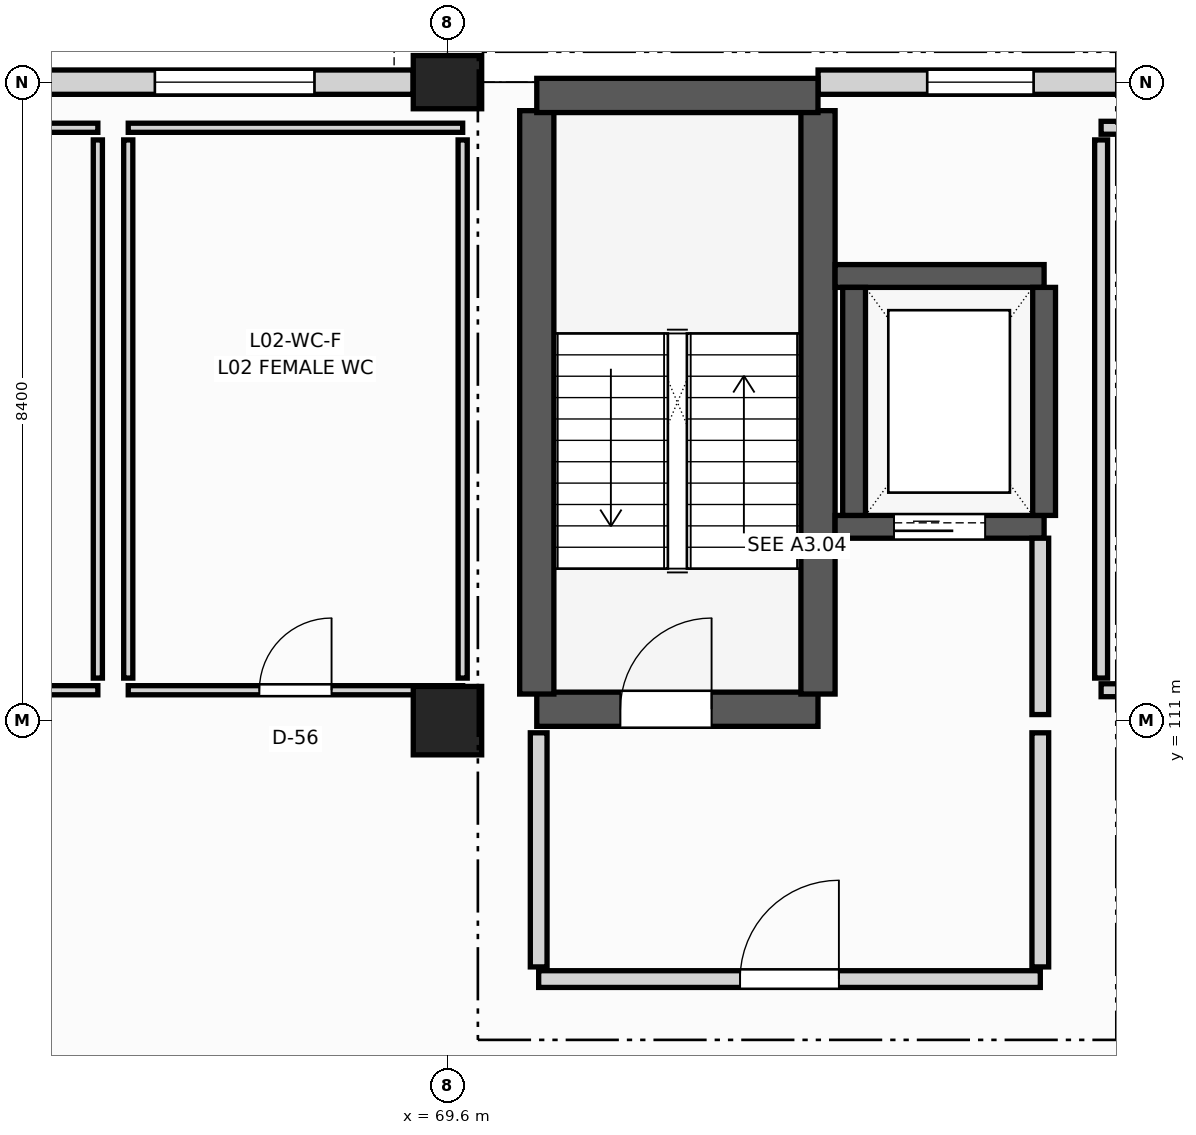
"""IFC4 building model, lengths in metres.
Left out: names, types, materials, properties, quantities, classifications, styles, units other than length and angle.
Written with IfcOpenShell. Run it as: python <this file> out.ifc"""

import sys

from ifc_helpers import new_model, si_unit, direction, frame, frame_2d, origin, origin_2d, place, context, subcontext, project, spatial, rectangle, extrude, element, fill, save


model = new_model("IFC4")
c1 = context("Model", 3, precision=1e-05, world=origin(), true_north=direction((0.0, 1.0)))
c2 = subcontext(c1, "Body", "Model", "MODEL_VIEW")
j1 = project(units=[si_unit("LENGTHUNIT", "METRE"), si_unit("PLANEANGLEUNIT", "RADIAN")], contexts=[c1])
p1 = place(None, origin())
s1 = spatial("IfcSite", under=j1, at=p1, CompositionType="ELEMENT")
p2 = place(p1, origin())
s2 = spatial("IfcBuilding", under=s1, at=p2, CompositionType="ELEMENT")
p3 = place(p2, frame((0.0, 0.0, 9.9)))
s3 = spatial("IfcBuildingStorey", under=s2, at=p3, CompositionType="ELEMENT", Elevation=9.9)
p4 = place(p3, frame((69.6, 111.0, 0.0), z_axis=(0.0, 0.0, 1.0), x_axis=(1.0, 0.0, 0.0)))
e1 = element("IfcColumn", 1, at=p4, inside=s3, PredefinedType="COLUMN", context=c2, shape_type="SweptSolid", body=[
    extrude(rectangle(XDim=0.9, YDim=0.9, at=origin_2d()), origin(), (0.0, 0.0, 1.0), 3.9),
])
p5 = place(p3, frame((69.6, 119.4, 0.0), z_axis=(0.0, 0.0, 1.0), x_axis=(1.0, 0.0, 0.0)))
e2 = element("IfcColumn", 2, at=p5, inside=s3, PredefinedType="COLUMN", context=c2, shape_type="SweptSolid", body=[
    extrude(rectangle(XDim=0.9, YDim=0.7, at=origin_2d()), origin(), (0.0, 0.0, 1.0), 3.9),
])
p6 = place(p3, frame((60.452, 119.4, 0.0), z_axis=(0.0, 0.0, 1.0), x_axis=(1.0, 0.0, 0.0)))
e3 = element("IfcWall", 3, at=p6, inside=s3, PredefinedType="SOLIDWALL", context=c2, shape_type="SweptSolid", body=[
    extrude(rectangle(XDim=8.696, YDim=0.32, at=frame_2d((4.348, 0.0))), origin(), (0.0, 0.0, 1.0), 3.08),
])
p7 = place(p6, frame((1.298, 0.0, 0.85)))
e4 = element("IfcOpeningElement", 4, at=p7, cuts=e3, PredefinedType="OPENING", context=c2, shape_type="SweptSolid", body=[
    extrude(rectangle(XDim=2.1, YDim=1.95, at=frame_2d((1.05, 0.975))), frame((0.0, 0.17, 0.0), z_axis=(0.0, -1.0, 0.0), x_axis=(1.0, 0.0, 0.0)), (0.0, 0.0, 1.0), 0.34),
])
p8 = place(p6, frame((5.298, 0.0, 0.85)))
e5 = element("IfcOpeningElement", 5, at=p8, cuts=e3, PredefinedType="OPENING", context=c2, shape_type="SweptSolid", body=[
    extrude(rectangle(XDim=2.1, YDim=1.95, at=frame_2d((1.05, 0.975))), frame((0.0, 0.17, 0.0), z_axis=(0.0, -1.0, 0.0), x_axis=(1.0, 0.0, 0.0)), (0.0, 0.0, 1.0), 0.34),
])
p9 = place(p3, frame((74.476, 119.4, 0.0), z_axis=(0.0, 0.0, 1.0), x_axis=(1.0, 0.0, 0.0)))
e6 = element("IfcWall", 6, at=p9, inside=s3, PredefinedType="SOLIDWALL", context=c2, shape_type="SweptSolid", body=[
    extrude(rectangle(XDim=4.272, YDim=0.32, at=frame_2d((2.136, 0.0))), origin(), (0.0, 0.0, 1.0), 3.08),
])
p10 = place(p9, frame((1.436, 0.0, 0.9)))
e7 = element("IfcOpeningElement", 7, at=p10, cuts=e6, PredefinedType="OPENING", context=c2, shape_type="SweptSolid", body=[
    extrude(rectangle(XDim=1.4, YDim=1.65, at=frame_2d((0.7, 0.825))), frame((0.0, 0.17, 0.0), z_axis=(0.0, -1.0, 0.0), x_axis=(1.0, 0.0, 0.0)), (0.0, 0.0, 1.0), 0.34),
])
p11 = place(p3, frame((70.775, 111.15, 0.0), z_axis=(0.0, 0.0, 1.0), x_axis=(1.0, 0.0, 0.0)))
e8 = element("IfcWall", 8, at=p11, inside=s3, PredefinedType="SHEAR", context=c2, shape_type="SweptSolid", body=[
    extrude(rectangle(XDim=3.7, YDim=0.45, at=frame_2d((1.85, 0.0))), origin(), (0.0, 0.0, 1.0), 3.9),
])
p12 = place(p11, frame((1.1, 0.0, 0.0)))
e9 = element("IfcOpeningElement", 9, at=p12, cuts=e8, PredefinedType="OPENING", context=c2, shape_type="SweptSolid", body=[
    extrude(rectangle(XDim=1.2, YDim=2.2, at=frame_2d((0.6, 1.1))), frame((0.0, 0.235, 0.0), z_axis=(0.0, -1.0, 0.0), x_axis=(1.0, 0.0, 0.0)), (0.0, 0.0, 1.0), 0.47),
])
for number, where, z_axis, x_axis in (
    (10, (70.775, 111.35, 0.0), (0.0, 0.0, 1.0), (0.0, 1.0, 0.0)),
    (11, (74.475, 111.35, 0.0), (0.0, 0.0, 1.0), (0.0, 1.0, 0.0)),
):
    element("IfcWall", number, at=place(p3, frame(where, z_axis=z_axis, x_axis=x_axis)), inside=s3, PredefinedType="SHEAR", context=c2, shape_type="SweptSolid", body=[
        extrude(rectangle(XDim=7.675, YDim=0.45, at=frame_2d((3.837, 0.0))), origin(), (0.0, 0.0, 1.0), 3.9),
    ])
p13 = place(p3, frame((70.775, 119.225, 0.0), z_axis=(0.0, 0.0, 1.0), x_axis=(1.0, 0.0, 0.0)))
e12 = element("IfcWall", 12, at=p13, inside=s3, PredefinedType="SHEAR", context=c2, shape_type="SweptSolid", body=[
    extrude(rectangle(XDim=3.7, YDim=0.45, at=frame_2d((1.85, 0.0))), origin(), (0.0, 0.0, 1.0), 3.9),
])
p14 = place(p3, frame((74.7, 113.55, 0.0), z_axis=(0.0, 0.0, 1.0), x_axis=(1.0, 0.0, 0.0)))
e13 = element("IfcWall", 13, at=p14, inside=s3, PredefinedType="SHEAR", context=c2, shape_type="SweptSolid", body=[
    extrude(rectangle(XDim=2.75, YDim=0.3, at=frame_2d((1.375, 0.0))), origin(), (0.0, 0.0, 1.0), 3.9),
])
p15 = place(p14, frame((0.775, 0.0, 0.0)))
e14 = element("IfcOpeningElement", 14, at=p15, cuts=e13, PredefinedType="OPENING", context=c2, shape_type="SweptSolid", body=[
    extrude(rectangle(XDim=1.2, YDim=2.2, at=frame_2d((0.6, 1.1))), frame((0.0, 0.16, 0.0), z_axis=(0.0, -1.0, 0.0), x_axis=(1.0, 0.0, 0.0)), (0.0, 0.0, 1.0), 0.32),
])
p16 = place(p3, frame((74.7, 116.85, 0.0), z_axis=(0.0, 0.0, 1.0), x_axis=(1.0, 0.0, 0.0)))
e15 = element("IfcWall", 15, at=p16, inside=s3, PredefinedType="SHEAR", context=c2, shape_type="SweptSolid", body=[
    extrude(rectangle(XDim=2.75, YDim=0.3, at=frame_2d((1.375, 0.0))), origin(), (0.0, 0.0, 1.0), 3.9),
])
for number, where, z_axis, x_axis in (
    (16, (74.95, 113.7, 0.0), (0.0, 0.0, 1.0), (0.0, 1.0, 0.0)),
    (17, (77.45, 113.7, 0.0), (0.0, 0.0, 1.0), (0.0, 1.0, 0.0)),
):
    element("IfcWall", number, at=place(p3, frame(where, z_axis=z_axis, x_axis=x_axis)), inside=s3, PredefinedType="SHEAR", context=c2, shape_type="SweptSolid", body=[
        extrude(rectangle(XDim=3.0, YDim=0.3, at=frame_2d((1.5, 0.0))), origin(), (0.0, 0.0, 1.0), 3.9),
    ])
p17 = place(p3, frame((70.8, 107.6, 0.0), z_axis=(0.0, 0.0, 1.0), x_axis=(1.0, 0.0, 0.0)))
e18 = element("IfcWall", 18, at=p17, inside=s3, PredefinedType="PARTITIONING", context=c2, shape_type="SweptSolid", body=[
    extrude(rectangle(XDim=6.6, YDim=0.22, at=frame_2d((3.3, 0.0))), origin(), (0.0, 0.0, 1.0), 2.92),
])
p18 = place(p17, frame((2.65, 0.0, 0.0)))
e19 = element("IfcOpeningElement", 19, at=p18, cuts=e18, PredefinedType="OPENING", context=c2, shape_type="SweptSolid", body=[
    extrude(rectangle(XDim=1.3, YDim=2.2, at=frame_2d((0.65, 1.1))), frame((0.0, 0.12, 0.0), z_axis=(0.0, -1.0, 0.0), x_axis=(1.0, 0.0, 0.0)), (0.0, 0.0, 1.0), 0.24),
])
p19 = place(p3, frame((77.4, 111.08, 0.0), z_axis=(0.0, 0.0, 1.0), x_axis=(0.0, 1.0, 0.0)))
e20 = element("IfcWall", 20, at=p19, inside=s3, PredefinedType="PARTITIONING", context=c2, shape_type="SweptSolid", body=[
    extrude(rectangle(XDim=2.32, YDim=0.22, at=frame_2d((1.16, 0.0))), origin(), (0.0, 0.0, 1.0), 2.92),
])
for number, where, z_axis, x_axis in (
    (21, (70.8, 107.76, 0.0), (0.0, 0.0, 1.0), (0.0, 1.0, 0.0)),
    (22, (77.4, 107.76, 0.0), (0.0, 0.0, 1.0), (0.0, 1.0, 0.0)),
):
    element("IfcWall", number, at=place(p3, frame(where, z_axis=z_axis, x_axis=x_axis)), inside=s3, PredefinedType="PARTITIONING", context=c2, shape_type="SweptSolid", body=[
        extrude(rectangle(XDim=3.08, YDim=0.22, at=frame_2d((1.54, 0.0))), origin(), (0.0, 0.0, 1.0), 2.92),
    ])
p20 = place(p3, frame((78.2, 111.4, 0.0), z_axis=(0.0, 0.0, 1.0), x_axis=(1.0, 0.0, 0.0)))
e23 = element("IfcWall", 23, at=p20, inside=s3, PredefinedType="PARTITIONING", context=c2, shape_type="SweptSolid", body=[
    extrude(rectangle(XDim=21.4, YDim=0.17, at=frame_2d((10.7, 0.0))), origin(), (0.0, 0.0, 1.0), 2.92),
])
p21 = place(p20, frame((6.94, 0.0, 0.0)))
e24 = element("IfcOpeningElement", 24, at=p21, cuts=e23, PredefinedType="OPENING", context=c2, shape_type="SweptSolid", body=[
    extrude(rectangle(XDim=1.1, YDim=2.2, at=frame_2d((0.55, 1.1))), frame((0.0, 0.095, 0.0), z_axis=(0.0, -1.0, 0.0), x_axis=(1.0, 0.0, 0.0)), (0.0, 0.0, 1.0), 0.19),
])
p22 = place(p3, frame((78.2, 118.8, 0.0), z_axis=(0.0, 0.0, 1.0), x_axis=(1.0, 0.0, 0.0)))
e25 = element("IfcWall", 25, at=p22, inside=s3, PredefinedType="PARTITIONING", context=c2, shape_type="SweptSolid", body=[
    extrude(rectangle(XDim=21.4, YDim=0.17, at=frame_2d((10.7, 0.0))), origin(), (0.0, 0.0, 1.0), 2.92),
])
p23 = place(p3, frame((78.2, 111.56, 0.0), z_axis=(0.0, 0.0, 1.0), x_axis=(0.0, 1.0, 0.0)))
e26 = element("IfcWall", 26, at=p23, inside=s3, PredefinedType="PARTITIONING", context=c2, shape_type="SweptSolid", body=[
    extrude(rectangle(XDim=7.08, YDim=0.17, at=frame_2d((3.54, 0.0))), origin(), (0.0, 0.0, 1.0), 2.92),
])
p24 = place(p3, frame((60.8, 111.4, 0.0), z_axis=(0.0, 0.0, 1.0), x_axis=(1.0, 0.0, 0.0)))
e27 = element("IfcWall", 27, at=p24, inside=s3, PredefinedType="PARTITIONING", context=c2, shape_type="SweptSolid", body=[
    extrude(rectangle(XDim=4.2, YDim=0.12, at=frame_2d((2.1, 0.0))), origin(), (0.0, 0.0, 1.0), 2.92),
])
p25 = place(p24, frame((1.625, 0.0, 0.0)))
e28 = element("IfcOpeningElement", 28, at=p25, cuts=e27, PredefinedType="OPENING", context=c2, shape_type="SweptSolid", body=[
    extrude(rectangle(XDim=0.95, YDim=2.1, at=frame_2d((0.475, 1.05))), frame((0.0, 0.07, 0.0), z_axis=(0.0, -1.0, 0.0), x_axis=(1.0, 0.0, 0.0)), (0.0, 0.0, 1.0), 0.14),
])
p26 = place(p3, frame((60.8, 118.8, 0.0), z_axis=(0.0, 0.0, 1.0), x_axis=(1.0, 0.0, 0.0)))
e29 = element("IfcWall", 29, at=p26, inside=s3, PredefinedType="PARTITIONING", context=c2, shape_type="SweptSolid", body=[
    extrude(rectangle(XDim=4.2, YDim=0.12, at=frame_2d((2.1, 0.0))), origin(), (0.0, 0.0, 1.0), 2.92),
])
p27 = place(p3, frame((65.0, 111.56, 0.0), z_axis=(0.0, 0.0, 1.0), x_axis=(0.0, 1.0, 0.0)))
e30 = element("IfcWall", 30, at=p27, inside=s3, PredefinedType="PARTITIONING", context=c2, shape_type="SweptSolid", body=[
    extrude(rectangle(XDim=7.08, YDim=0.12, at=frame_2d((3.54, 0.0))), origin(), (0.0, 0.0, 1.0), 2.92),
])
p28 = place(p3, frame((65.4, 111.4, 0.0), z_axis=(0.0, 0.0, 1.0), x_axis=(1.0, 0.0, 0.0)))
e31 = element("IfcWall", 31, at=p28, inside=s3, PredefinedType="PARTITIONING", context=c2, shape_type="SweptSolid", body=[
    extrude(rectangle(XDim=4.4, YDim=0.12, at=frame_2d((2.2, 0.0))), origin(), (0.0, 0.0, 1.0), 2.92),
])
p29 = place(p28, frame((1.725, 0.0, 0.0)))
e32 = element("IfcOpeningElement", 32, at=p29, cuts=e31, PredefinedType="OPENING", context=c2, shape_type="SweptSolid", body=[
    extrude(rectangle(XDim=0.95, YDim=2.1, at=frame_2d((0.475, 1.05))), frame((0.0, 0.07, 0.0), z_axis=(0.0, -1.0, 0.0), x_axis=(1.0, 0.0, 0.0)), (0.0, 0.0, 1.0), 0.14),
])
p30 = place(p3, frame((65.4, 118.8, 0.0), z_axis=(0.0, 0.0, 1.0), x_axis=(1.0, 0.0, 0.0)))
e33 = element("IfcWall", 33, at=p30, inside=s3, PredefinedType="PARTITIONING", context=c2, shape_type="SweptSolid", body=[
    extrude(rectangle(XDim=4.4, YDim=0.12, at=frame_2d((2.2, 0.0))), origin(), (0.0, 0.0, 1.0), 2.92),
])
for number, where, z_axis, x_axis in (
    (34, (65.4, 111.56, 0.0), (0.0, 0.0, 1.0), (0.0, 1.0, 0.0)),
    (35, (69.8, 111.56, 0.0), (0.0, 0.0, 1.0), (0.0, 1.0, 0.0)),
):
    element("IfcWall", number, at=place(p3, frame(where, z_axis=z_axis, x_axis=x_axis)), inside=s3, PredefinedType="PARTITIONING", context=c2, shape_type="SweptSolid", body=[
        extrude(rectangle(XDim=7.08, YDim=0.12, at=frame_2d((3.54, 0.0))), origin(), (0.0, 0.0, 1.0), 2.92),
    ])
p31 = place(p8, origin())
e36 = element("IfcWindow", 36, at=p31, inside=s3, PartitioningType="SINGLE_PANEL", PredefinedType="WINDOW", context=c2, shape_type="SweptSolid", body=[
    extrude(rectangle(XDim=2.1, YDim=1.95, at=frame_2d((1.05, 0.975))), frame((0.0, 0.03, 0.0), z_axis=(0.0, -1.0, 0.0), x_axis=(1.0, 0.0, 0.0)), (0.0, 0.0, 1.0), 0.06),
])
fill(e5, e36)
p32 = place(p10, origin())
e37 = element("IfcWindow", 37, at=p32, inside=s3, PartitioningType="SINGLE_PANEL", PredefinedType="WINDOW", context=c2, shape_type="SweptSolid", body=[
    extrude(rectangle(XDim=1.4, YDim=1.65, at=frame_2d((0.7, 0.825))), frame((0.0, 0.03, 0.0), z_axis=(0.0, -1.0, 0.0), x_axis=(1.0, 0.0, 0.0)), (0.0, 0.0, 1.0), 0.06),
])
fill(e7, e37)
p33 = place(p12, origin())
e38 = element("IfcDoor", 38, at=p33, inside=s3, OperationType="SINGLE_SWING_RIGHT", PredefinedType="DOOR", context=c2, shape_type="SweptSolid", body=[
    extrude(rectangle(XDim=1.2, YDim=2.2, at=frame_2d((0.6, 1.1))), frame((0.0, 0.025, 0.0), z_axis=(0.0, -1.0, 0.0), x_axis=(1.0, 0.0, 0.0)), (0.0, 0.0, 1.0), 0.05),
])
fill(e9, e38)
p34 = place(p15, origin())
e39 = element("IfcDoor", 39, at=p34, inside=s3, OperationType="SLIDING_TO_LEFT", PredefinedType="DOOR", context=c2, shape_type="SweptSolid", body=[
    extrude(rectangle(XDim=1.2, YDim=2.2, at=frame_2d((0.6, 1.1))), frame((0.0, 0.025, 0.0), z_axis=(0.0, -1.0, 0.0), x_axis=(1.0, 0.0, 0.0)), (0.0, 0.0, 1.0), 0.05),
])
fill(e14, e39)
p35 = place(p18, origin())
e40 = element("IfcDoor", 40, at=p35, inside=s3, OperationType="SINGLE_SWING_RIGHT", PredefinedType="DOOR", context=c2, shape_type="SweptSolid", body=[
    extrude(rectangle(XDim=1.3, YDim=2.2, at=frame_2d((0.65, 1.1))), frame((0.0, 0.025, 0.0), z_axis=(0.0, -1.0, 0.0), x_axis=(1.0, 0.0, 0.0)), (0.0, 0.0, 1.0), 0.05),
])
fill(e19, e40)
p36 = place(p29, origin())
e41 = element("IfcDoor", 41, at=p36, inside=s3, OperationType="SINGLE_SWING_RIGHT", PredefinedType="DOOR", context=c2, shape_type="SweptSolid", body=[
    extrude(rectangle(XDim=0.95, YDim=2.1, at=frame_2d((0.475, 1.05))), frame((0.0, 0.025, 0.0), z_axis=(0.0, -1.0, 0.0), x_axis=(1.0, 0.0, 0.0)), (0.0, 0.0, 1.0), 0.05),
])
fill(e32, e41)
save(model, sys.argv[1])
